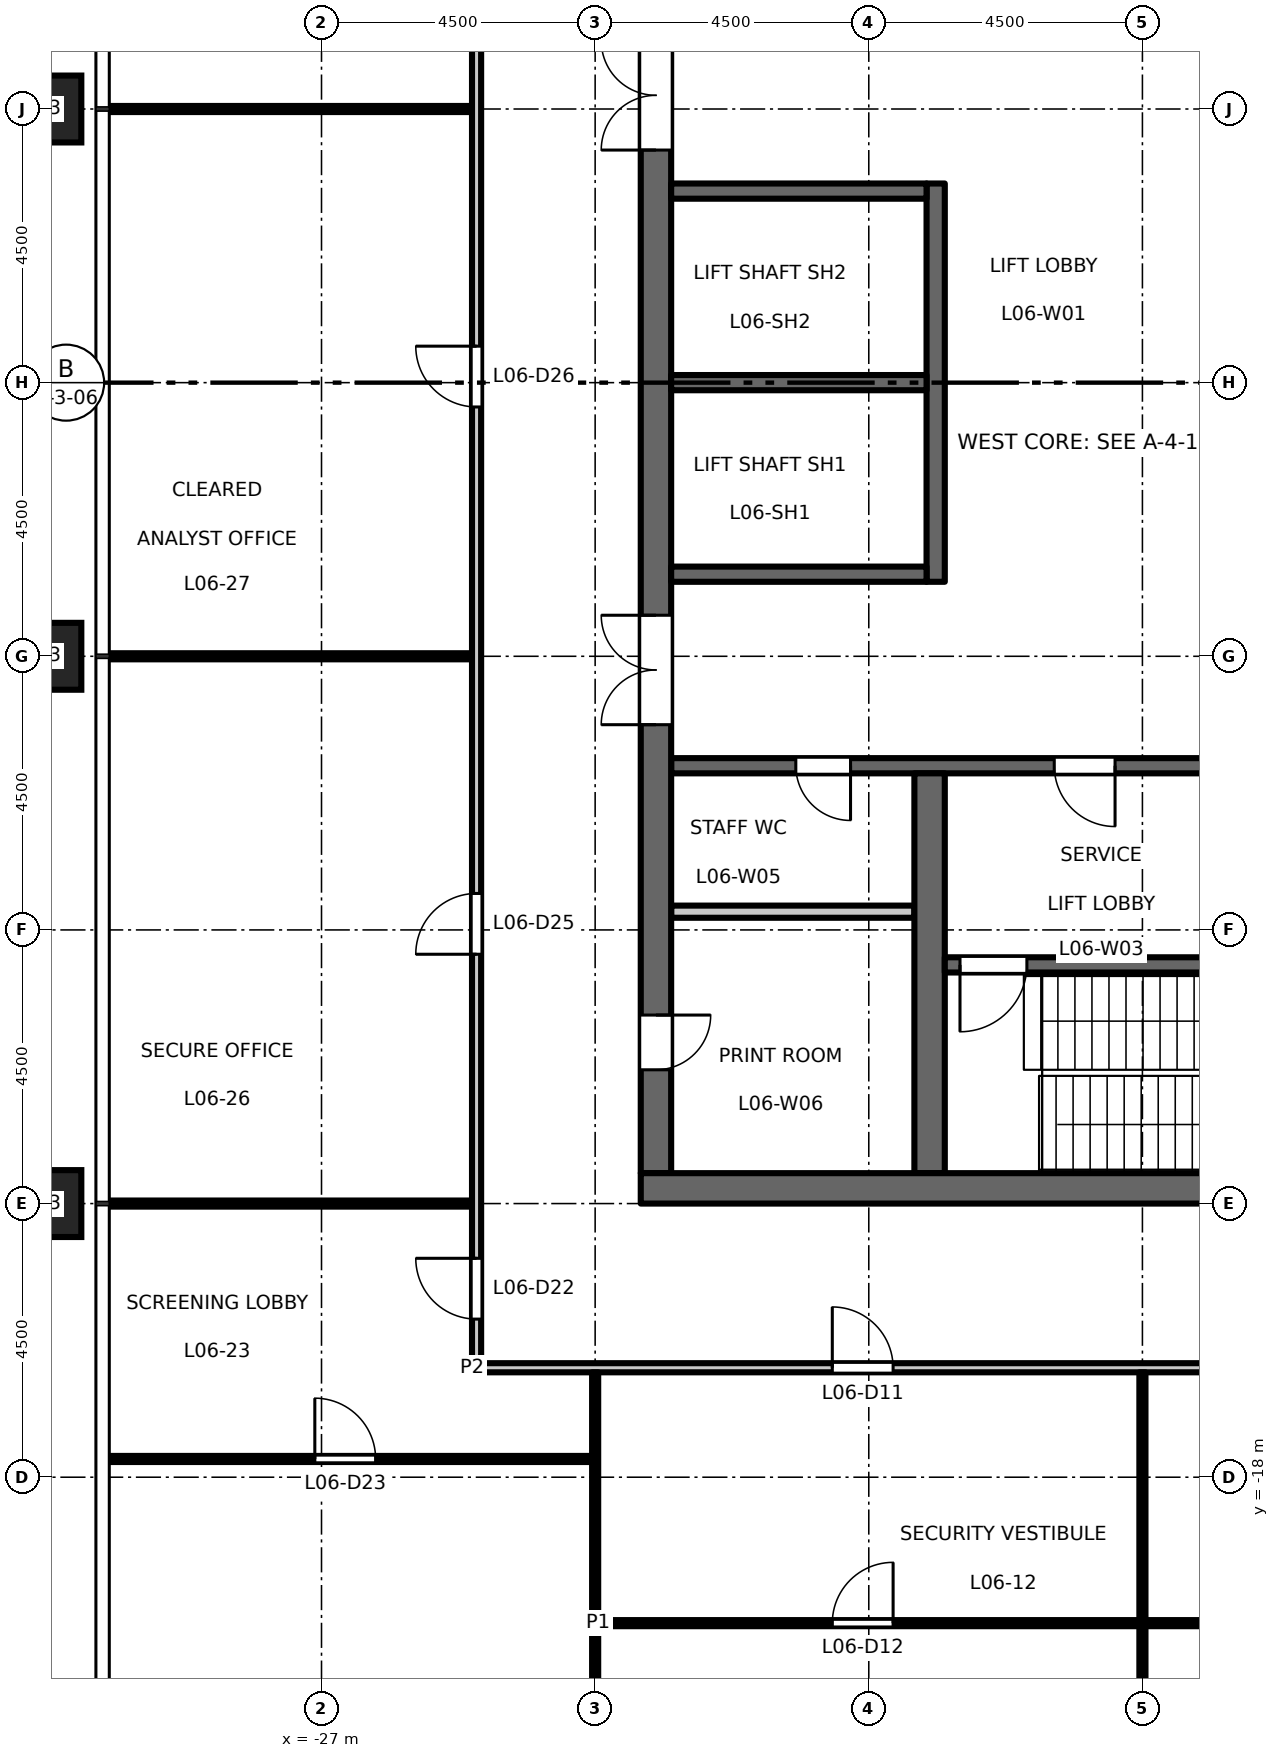
"""IFC4 building model, lengths in metres.
Left out: names, types, materials, properties, quantities, classifications, styles, units other than length and angle.
Written with IfcOpenShell. Run it as: python <this file> out.ifc"""

import sys

from ifc_helpers import new_model, si_unit, direction, frame, frame_2d, origin, origin_2d, place, context, subcontext, project, spatial, rectangle, hollow_rectangle, extrude, element, fill, save


model = new_model("IFC4")
c1 = context("Model", 3, precision=1e-05, world=origin(), true_north=direction((0.0, 1.0)))
c2 = subcontext(c1, "Body", "Model", "MODEL_VIEW")
j1 = project(units=[si_unit("LENGTHUNIT", "METRE"), si_unit("PLANEANGLEUNIT", "RADIAN")], contexts=[c1])
p1 = place(None, origin())
s1 = spatial("IfcSite", under=j1, at=p1, CompositionType="ELEMENT")
p2 = place(p1, origin())
s2 = spatial("IfcBuilding", under=s1, at=p2, CompositionType="ELEMENT")
p3 = place(p2, frame((0.0, 0.0, 31.2)))
s3 = spatial("IfcBuildingStorey", under=s2, at=p3, CompositionType="ELEMENT", Elevation=31.2)
for number, where, z_axis, x_axis in (
    (1, (-31.5, 4.5, 0.0), (0.0, 0.0, 1.0), (1.0, 0.0, 0.0)),
    (2, (-31.5, -4.5, 0.0), (0.0, 0.0, 1.0), (1.0, 0.0, 0.0)),
    (3, (-31.5, -13.5, 0.0), (0.0, 0.0, 1.0), (1.0, 0.0, 0.0)),
):
    element("IfcColumn", number, at=place(p3, frame(where, z_axis=z_axis, x_axis=x_axis)), inside=s3, PredefinedType="COLUMN", context=c2, shape_type="SweptSolid", body=[
        extrude(hollow_rectangle(XDim=1.1, YDim=1.1, WallThickness=0.07, at=origin_2d()), origin(), (0.0, 0.0, 1.0), 4.5),
    ])
p4 = place(p3, frame((-12.15, -6.3, 0.0), z_axis=(0.0, 0.0, 1.0), x_axis=(-1.0, 0.0, 0.0)))
e4 = element("IfcWall", 4, at=p4, inside=s3, PredefinedType="SHEAR", context=c2, shape_type="SweptSolid", body=[
    extrude(rectangle(XDim=9.1, YDim=0.25, at=frame_2d((4.55, 0.0))), origin(), (0.0, 0.0, 1.0), 4.35),
])
p5 = place(p4, frame((1.8, 0.0, 0.0)))
e5 = element("IfcOpeningElement", 5, at=p5, cuts=e4, PredefinedType="OPENING", context=c2, shape_type="SweptSolid", body=[
    extrude(rectangle(XDim=1.0, YDim=2.1, at=frame_2d((0.5, 1.05))), frame((0.0, 0.135, 0.0), z_axis=(0.0, -1.0, 0.0), x_axis=(1.0, 0.0, 0.0)), (0.0, 0.0, 1.0), 0.27),
])
p6 = place(p4, frame((6.15, 0.0, 0.0)))
e6 = element("IfcOpeningElement", 6, at=p6, cuts=e4, PredefinedType="OPENING", context=c2, shape_type="SweptSolid", body=[
    extrude(rectangle(XDim=0.9, YDim=2.1, at=frame_2d((0.45, 1.05))), frame((0.0, 0.135, 0.0), z_axis=(0.0, -1.0, 0.0), x_axis=(1.0, 0.0, 0.0)), (0.0, 0.0, 1.0), 0.27),
])
p7 = place(p3, frame((-21.5, -13.0, 0.0), z_axis=(0.0, 0.0, 1.0), x_axis=(0.0, 1.0, 0.0)))
e7 = element("IfcWall", 7, at=p7, inside=s3, PredefinedType="SHEAR", context=c2, shape_type="SweptSolid", body=[
    extrude(rectangle(XDim=26.0, YDim=0.5, at=frame_2d((13.0, 0.0))), origin(), (0.0, 0.0, 1.0), 4.35),
])
p8 = place(p7, frame((16.825, 0.0, 0.0)))
e8 = element("IfcOpeningElement", 8, at=p8, cuts=e7, PredefinedType="OPENING", context=c2, shape_type="SweptSolid", body=[
    extrude(rectangle(XDim=1.8, YDim=2.1, at=frame_2d((0.9, 1.05))), frame((0.0, 0.26, 0.0), z_axis=(0.0, -1.0, 0.0), x_axis=(1.0, 0.0, 0.0)), (0.0, 0.0, 1.0), 0.52),
])
p9 = place(p7, frame((7.375, 0.0, 0.0)))
e9 = element("IfcOpeningElement", 9, at=p9, cuts=e7, PredefinedType="OPENING", context=c2, shape_type="SweptSolid", body=[
    extrude(rectangle(XDim=1.8, YDim=2.1, at=frame_2d((0.9, 1.05))), frame((0.0, 0.26, 0.0), z_axis=(0.0, -1.0, 0.0), x_axis=(1.0, 0.0, 0.0)), (0.0, 0.0, 1.0), 0.52),
])
p10 = place(p7, frame((22.45, 0.0, 0.0)))
e10 = element("IfcOpeningElement", 10, at=p10, cuts=e7, PredefinedType="OPENING", context=c2, shape_type="SweptSolid", body=[
    extrude(rectangle(XDim=0.9, YDim=2.1, at=frame_2d((0.45, 1.05))), frame((0.0, 0.26, 0.0), z_axis=(0.0, -1.0, 0.0), x_axis=(1.0, 0.0, 0.0)), (0.0, 0.0, 1.0), 0.52),
])
p11 = place(p7, frame((1.7, 0.0, 0.0)))
e11 = element("IfcOpeningElement", 11, at=p11, cuts=e7, PredefinedType="OPENING", context=c2, shape_type="SweptSolid", body=[
    extrude(rectangle(XDim=0.9, YDim=2.1, at=frame_2d((0.45, 1.05))), frame((0.0, 0.26, 0.0), z_axis=(0.0, -1.0, 0.0), x_axis=(1.0, 0.0, 0.0)), (0.0, 0.0, 1.0), 0.52),
])
p12 = place(p3, frame((-17.25, -8.7, 0.0), z_axis=(0.0, 0.0, 1.0), x_axis=(-1.0, 0.0, 0.0)))
e12 = element("IfcWall", 12, at=p12, inside=s3, PredefinedType="PARTITIONING", context=c2, shape_type="SweptSolid", body=[
    extrude(rectangle(XDim=4.0, YDim=0.2, at=frame_2d((2.0, 0.0))), origin(), (0.0, 0.0, 1.0), 4.35),
])
p13 = place(p3, frame((-16.9, -3.275, 0.0), z_axis=(0.0, 0.0, 1.0), x_axis=(0.0, 1.0, 0.0)))
e13 = element("IfcWall", 13, at=p13, inside=s3, PredefinedType="SHEAR", context=c2, shape_type="SweptSolid", body=[
    extrude(rectangle(XDim=6.55, YDim=0.3, at=frame_2d((3.275, 0.0))), origin(), (0.0, 0.0, 1.0), 4.35),
])
for number, where, z_axis, x_axis in (
    (14, (-17.05, 0.0, 0.0), (0.0, 0.0, 1.0), (-1.0, 0.0, 0.0)),
    (15, (-17.05, 3.15, 0.0), (0.0, 0.0, 1.0), (-1.0, 0.0, 0.0)),
    (16, (-17.05, -3.15, 0.0), (0.0, 0.0, 1.0), (-1.0, 0.0, 0.0)),
):
    element("IfcWall", number, at=place(p3, frame(where, z_axis=z_axis, x_axis=x_axis)), inside=s3, PredefinedType="SHEAR", context=c2, shape_type="SweptSolid", body=[
        extrude(rectangle(XDim=4.2, YDim=0.25, at=frame_2d((2.1, 0.0))), origin(), (0.0, 0.0, 1.0), 4.35),
    ])
p14 = place(p3, frame((-17.0, -13.0, 0.0), z_axis=(0.0, 0.0, 1.0), x_axis=(0.0, 1.0, 0.0)))
e17 = element("IfcWall", 17, at=p14, inside=s3, PredefinedType="SHEAR", context=c2, shape_type="SweptSolid", body=[
    extrude(rectangle(XDim=6.575, YDim=0.5, at=frame_2d((3.288, 0.0))), origin(), (0.0, 0.0, 1.0), 4.35),
])
p15 = place(p3, frame((-8.75, -9.575, 0.0), z_axis=(0.0, 0.0, 1.0), x_axis=(-1.0, 0.0, 0.0)))
e18 = element("IfcWall", 18, at=p15, inside=s3, PredefinedType="SHEAR", context=c2, shape_type="SweptSolid", body=[
    extrude(rectangle(XDim=8.0, YDim=0.25, at=frame_2d((4.0, 0.0))), origin(), (0.0, 0.0, 1.0), 4.35),
])
p16 = place(p15, frame((6.65, 0.0, 0.0)))
e19 = element("IfcOpeningElement", 19, at=p16, cuts=e18, PredefinedType="OPENING", context=c2, shape_type="SweptSolid", body=[
    extrude(rectangle(XDim=1.1, YDim=2.1, at=frame_2d((0.55, 1.05))), frame((0.0, 0.135, 0.0), z_axis=(0.0, -1.0, 0.0), x_axis=(1.0, 0.0, 0.0)), (0.0, 0.0, 1.0), 0.27),
])
p17 = place(p3, frame((-8.25, -13.25, 0.0), z_axis=(0.0, 0.0, 1.0), x_axis=(-1.0, 0.0, 0.0)))
e20 = element("IfcWall", 20, at=p17, inside=s3, PredefinedType="SHEAR", context=c2, shape_type="SweptSolid", body=[
    extrude(rectangle(XDim=13.5, YDim=0.5, at=frame_2d((6.75, 0.0))), origin(), (0.0, 0.0, 1.0), 4.35),
])
p18 = place(p3, frame((-22.45, -20.4, 0.0), z_axis=(0.0, 0.0, 1.0), x_axis=(1.0, 0.0, 0.0)))
e21 = element("IfcWall", 21, at=p18, inside=s3, PredefinedType="PARTITIONING", context=c2, shape_type="SweptSolid", body=[
    extrude(rectangle(XDim=17.9, YDim=0.1, at=frame_2d((8.95, 0.0))), origin(), (0.0, 0.0, 1.0), 4.35),
])
p19 = place(p18, frame((3.85, 0.0, 0.0)))
e22 = element("IfcOpeningElement", 22, at=p19, cuts=e21, PredefinedType="OPENING", context=c2, shape_type="SweptSolid", body=[
    extrude(rectangle(XDim=1.0, YDim=2.1, at=frame_2d((0.5, 1.05))), frame((0.0, 0.06, 0.0), z_axis=(0.0, -1.0, 0.0), x_axis=(1.0, 0.0, 0.0)), (0.0, 0.0, 1.0), 0.12),
])
p20 = place(p18, frame((12.85, 0.0, 0.0)))
e23 = element("IfcOpeningElement", 23, at=p20, cuts=e21, PredefinedType="OPENING", context=c2, shape_type="SweptSolid", body=[
    extrude(rectangle(XDim=1.0, YDim=2.1, at=frame_2d((0.5, 1.05))), frame((0.0, 0.06, 0.0), z_axis=(0.0, -1.0, 0.0), x_axis=(1.0, 0.0, 0.0)), (0.0, 0.0, 1.0), 0.12),
])
p21 = place(p3, frame((-30.51, -17.7, 0.0), z_axis=(0.0, 0.0, 1.0), x_axis=(1.0, 0.0, 0.0)))
e24 = element("IfcWall", 24, at=p21, inside=s3, PredefinedType="PARTITIONING", context=c2, shape_type="SweptSolid", body=[
    extrude(rectangle(XDim=7.96, YDim=0.1, at=frame_2d((3.98, 0.0))), origin(), (0.0, 0.0, 1.0), 4.35),
])
p22 = place(p21, frame((3.4, 0.0, 0.0)))
e25 = element("IfcOpeningElement", 25, at=p22, cuts=e24, PredefinedType="OPENING", context=c2, shape_type="SweptSolid", body=[
    extrude(rectangle(XDim=1.0, YDim=2.1, at=frame_2d((0.5, 1.05))), frame((0.0, 0.06, 0.0), z_axis=(0.0, -1.0, 0.0), x_axis=(1.0, 0.0, 0.0)), (0.0, 0.0, 1.0), 0.12),
])
p23 = place(p3, frame((-24.525, -16.2, 0.0), z_axis=(0.0, 0.0, 1.0), x_axis=(1.0, 0.0, 0.0)))
e26 = element("IfcWall", 26, at=p23, inside=s3, PredefinedType="PARTITIONING", context=c2, shape_type="SweptSolid", body=[
    extrude(rectangle(XDim=49.05, YDim=0.15, at=frame_2d((24.525, 0.0))), origin(), (0.0, 0.0, 1.0), 4.35),
])
p24 = place(p23, frame((5.925, 0.0, 0.0)))
e27 = element("IfcOpeningElement", 27, at=p24, cuts=e26, PredefinedType="OPENING", context=c2, shape_type="SweptSolid", body=[
    extrude(rectangle(XDim=1.0, YDim=2.1, at=frame_2d((0.5, 1.05))), frame((0.0, 0.085, 0.0), z_axis=(0.0, -1.0, 0.0), x_axis=(1.0, 0.0, 0.0)), (0.0, 0.0, 1.0), 0.17),
])
p25 = place(p23, frame((14.925, 0.0, 0.0)))
e28 = element("IfcOpeningElement", 28, at=p25, cuts=e26, PredefinedType="OPENING", context=c2, shape_type="SweptSolid", body=[
    extrude(rectangle(XDim=1.0, YDim=2.1, at=frame_2d((0.5, 1.05))), frame((0.0, 0.085, 0.0), z_axis=(0.0, -1.0, 0.0), x_axis=(1.0, 0.0, 0.0)), (0.0, 0.0, 1.0), 0.17),
])
p26 = place(p23, frame((23.925, 0.0, 0.0)))
e29 = element("IfcOpeningElement", 29, at=p26, cuts=e26, PredefinedType="OPENING", context=c2, shape_type="SweptSolid", body=[
    extrude(rectangle(XDim=1.0, YDim=2.1, at=frame_2d((0.5, 1.05))), frame((0.0, 0.085, 0.0), z_axis=(0.0, -1.0, 0.0), x_axis=(1.0, 0.0, 0.0)), (0.0, 0.0, 1.0), 0.17),
])
p27 = place(p23, frame((32.925, 0.0, 0.0)))
e30 = element("IfcOpeningElement", 30, at=p27, cuts=e26, PredefinedType="OPENING", context=c2, shape_type="SweptSolid", body=[
    extrude(rectangle(XDim=1.0, YDim=2.1, at=frame_2d((0.5, 1.05))), frame((0.0, 0.085, 0.0), z_axis=(0.0, -1.0, 0.0), x_axis=(1.0, 0.0, 0.0)), (0.0, 0.0, 1.0), 0.17),
])
p28 = place(p23, frame((41.925, 0.0, 0.0)))
e31 = element("IfcOpeningElement", 31, at=p28, cuts=e26, PredefinedType="OPENING", context=c2, shape_type="SweptSolid", body=[
    extrude(rectangle(XDim=1.0, YDim=2.1, at=frame_2d((0.5, 1.05))), frame((0.0, 0.085, 0.0), z_axis=(0.0, -1.0, 0.0), x_axis=(1.0, 0.0, 0.0)), (0.0, 0.0, 1.0), 0.17),
])
p29 = place(p3, frame((-30.51, -13.5, 0.0), z_axis=(0.0, 0.0, 1.0), x_axis=(1.0, 0.0, 0.0)))
e32 = element("IfcWall", 32, at=p29, inside=s3, PredefinedType="PARTITIONING", context=c2, shape_type="SweptSolid", body=[
    extrude(rectangle(XDim=5.985, YDim=0.1, at=frame_2d((2.993, 0.0))), origin(), (0.0, 0.0, 1.0), 3.35),
])
for number, where, z_axis, x_axis in (
    (33, (-30.51, -4.5, 0.0), (0.0, 0.0, 1.0), (1.0, 0.0, 0.0)),
    (34, (-30.51, 4.5, 0.0), (0.0, 0.0, 1.0), (1.0, 0.0, 0.0)),
):
    element("IfcWall", number, at=place(p3, frame(where, z_axis=z_axis, x_axis=x_axis)), inside=s3, PredefinedType="PARTITIONING", context=c2, shape_type="SweptSolid", body=[
        extrude(rectangle(XDim=5.985, YDim=0.1, at=frame_2d((2.993, 0.0))), origin(), (0.0, 0.0, 1.0), 4.35),
    ])
p30 = place(p3, frame((-24.45, -16.125, 0.0), z_axis=(0.0, 0.0, 1.0), x_axis=(0.0, 1.0, 0.0)))
e35 = element("IfcWall", 35, at=p30, inside=s3, PredefinedType="PARTITIONING", context=c2, shape_type="SweptSolid", body=[
    extrude(rectangle(XDim=32.25, YDim=0.15, at=frame_2d((16.125, 0.0))), origin(), (0.0, 0.0, 1.0), 4.35),
])
p31 = place(p30, frame((30.425, 0.0, 0.0)))
e36 = element("IfcOpeningElement", 36, at=p31, cuts=e35, PredefinedType="OPENING", context=c2, shape_type="SweptSolid", body=[
    extrude(rectangle(XDim=1.0, YDim=2.1, at=frame_2d((0.5, 1.05))), frame((0.0, 0.085, 0.0), z_axis=(0.0, -1.0, 0.0), x_axis=(1.0, 0.0, 0.0)), (0.0, 0.0, 1.0), 0.17),
])
p32 = place(p30, frame((0.725, 0.0, 0.0)))
e37 = element("IfcOpeningElement", 37, at=p32, cuts=e35, PredefinedType="OPENING", context=c2, shape_type="SweptSolid", body=[
    extrude(rectangle(XDim=1.0, YDim=2.1, at=frame_2d((0.5, 1.05))), frame((0.0, 0.085, 0.0), z_axis=(0.0, -1.0, 0.0), x_axis=(1.0, 0.0, 0.0)), (0.0, 0.0, 1.0), 0.17),
])
p33 = place(p30, frame((6.725, 0.0, 0.0)))
e38 = element("IfcOpeningElement", 38, at=p33, cuts=e35, PredefinedType="OPENING", context=c2, shape_type="SweptSolid", body=[
    extrude(rectangle(XDim=1.0, YDim=2.1, at=frame_2d((0.5, 1.05))), frame((0.0, 0.085, 0.0), z_axis=(0.0, -1.0, 0.0), x_axis=(1.0, 0.0, 0.0)), (0.0, 0.0, 1.0), 0.17),
])
p34 = place(p30, frame((15.725, 0.0, 0.0)))
e39 = element("IfcOpeningElement", 39, at=p34, cuts=e35, PredefinedType="OPENING", context=c2, shape_type="SweptSolid", body=[
    extrude(rectangle(XDim=1.0, YDim=2.1, at=frame_2d((0.5, 1.05))), frame((0.0, 0.085, 0.0), z_axis=(0.0, -1.0, 0.0), x_axis=(1.0, 0.0, 0.0)), (0.0, 0.0, 1.0), 0.17),
])
p35 = place(p30, frame((24.725, 0.0, 0.0)))
e40 = element("IfcOpeningElement", 40, at=p35, cuts=e35, PredefinedType="OPENING", context=c2, shape_type="SweptSolid", body=[
    extrude(rectangle(XDim=1.0, YDim=2.1, at=frame_2d((0.5, 1.05))), frame((0.0, 0.085, 0.0), z_axis=(0.0, -1.0, 0.0), x_axis=(1.0, 0.0, 0.0)), (0.0, 0.0, 1.0), 0.17),
])
p36 = place(p3, frame((-22.5, -30.428, 0.0), z_axis=(0.0, 0.0, 1.0), x_axis=(0.0, 1.0, 0.0)))
e41 = element("IfcWall", 41, at=p36, inside=s3, PredefinedType="PARTITIONING", context=c2, shape_type="SweptSolid", body=[
    extrude(rectangle(XDim=14.153, YDim=0.1, at=frame_2d((7.077, 0.0))), origin(), (0.0, 0.0, 1.0), 3.35),
])
p37 = place(p3, frame((-13.5, -30.51, 0.0), z_axis=(0.0, 0.0, 1.0), x_axis=(0.0, 1.0, 0.0)))
e42 = element("IfcWall", 42, at=p37, inside=s3, PredefinedType="PARTITIONING", context=c2, shape_type="SweptSolid", body=[
    extrude(rectangle(XDim=10.06, YDim=0.1, at=frame_2d((5.03, 0.0))), origin(), (0.0, 0.0, 1.0), 3.35),
])
p38 = place(p3, frame((-13.5, -20.35, 0.0), z_axis=(0.0, 0.0, 1.0), x_axis=(0.0, 1.0, 0.0)))
e43 = element("IfcWall", 43, at=p38, inside=s3, PredefinedType="PARTITIONING", context=c2, shape_type="SweptSolid", body=[
    extrude(rectangle(XDim=4.075, YDim=0.1, at=frame_2d((2.038, 0.0))), origin(), (0.0, 0.0, 1.0), 3.35),
])
p39 = place(p5, origin())
e44 = element("IfcDoor", 44, at=p39, inside=s3, OperationType="SINGLE_SWING_RIGHT", PredefinedType="DOOR", context=c2, shape_type="SweptSolid", body=[
    extrude(rectangle(XDim=1.0, YDim=2.1, at=frame_2d((0.5, 1.05))), frame((0.0, 0.025, 0.0), z_axis=(0.0, -1.0, 0.0), x_axis=(1.0, 0.0, 0.0)), (0.0, 0.0, 1.0), 0.05),
])
fill(e5, e44)
p40 = place(p16, origin())
e45 = element("IfcDoor", 45, at=p40, inside=s3, OperationType="SINGLE_SWING_LEFT", PredefinedType="DOOR", context=c2, shape_type="SweptSolid", body=[
    extrude(rectangle(XDim=1.1, YDim=2.1, at=frame_2d((0.55, 1.05))), frame((0.0, 0.025, 0.0), z_axis=(0.0, -1.0, 0.0), x_axis=(1.0, 0.0, 0.0)), (0.0, 0.0, 1.0), 0.05),
])
fill(e19, e45)
p41 = place(p8, origin())
e46 = element("IfcDoor", 46, at=p41, inside=s3, OperationType="DOUBLE_DOOR_DOUBLE_SWING", PredefinedType="DOOR", context=c2, shape_type="SweptSolid", body=[
    extrude(rectangle(XDim=1.8, YDim=2.1, at=frame_2d((0.9, 1.05))), frame((0.0, 0.025, 0.0), z_axis=(0.0, -1.0, 0.0), x_axis=(1.0, 0.0, 0.0)), (0.0, 0.0, 1.0), 0.05),
])
fill(e8, e46)
p42 = place(p9, origin())
e47 = element("IfcDoor", 47, at=p42, inside=s3, OperationType="DOUBLE_DOOR_DOUBLE_SWING", PredefinedType="DOOR", context=c2, shape_type="SweptSolid", body=[
    extrude(rectangle(XDim=1.8, YDim=2.1, at=frame_2d((0.9, 1.05))), frame((0.0, 0.025, 0.0), z_axis=(0.0, -1.0, 0.0), x_axis=(1.0, 0.0, 0.0)), (0.0, 0.0, 1.0), 0.05),
])
fill(e9, e47)
p43 = place(p6, origin())
e48 = element("IfcDoor", 48, at=p43, inside=s3, OperationType="SINGLE_SWING_RIGHT", PredefinedType="DOOR", context=c2, shape_type="SweptSolid", body=[
    extrude(rectangle(XDim=0.9, YDim=2.1, at=frame_2d((0.45, 1.05))), frame((0.0, 0.025, 0.0), z_axis=(0.0, -1.0, 0.0), x_axis=(1.0, 0.0, 0.0)), (0.0, 0.0, 1.0), 0.05),
])
fill(e6, e48)
p44 = place(p11, origin())
e49 = element("IfcDoor", 49, at=p44, inside=s3, OperationType="SINGLE_SWING_RIGHT", PredefinedType="DOOR", context=c2, shape_type="SweptSolid", body=[
    extrude(rectangle(XDim=0.9, YDim=2.1, at=frame_2d((0.45, 1.05))), frame((0.0, 0.025, 0.0), z_axis=(0.0, -1.0, 0.0), x_axis=(1.0, 0.0, 0.0)), (0.0, 0.0, 1.0), 0.05),
])
fill(e11, e49)
p45 = place(p24, origin())
e50 = element("IfcDoor", 50, at=p45, inside=s3, OperationType="SINGLE_SWING_LEFT", PredefinedType="DOOR", context=c2, shape_type="SweptSolid", body=[
    extrude(rectangle(XDim=1.0, YDim=2.1, at=frame_2d((0.5, 1.05))), frame((0.0, 0.025, 0.0), z_axis=(0.0, -1.0, 0.0), x_axis=(1.0, 0.0, 0.0)), (0.0, 0.0, 1.0), 0.05),
])
fill(e27, e50)
p46 = place(p19, origin())
e51 = element("IfcDoor", 51, at=p46, inside=s3, OperationType="SINGLE_SWING_RIGHT", PredefinedType="DOOR", context=c2, shape_type="SweptSolid", body=[
    extrude(rectangle(XDim=1.0, YDim=2.1, at=frame_2d((0.5, 1.05))), frame((0.0, 0.025, 0.0), z_axis=(0.0, -1.0, 0.0), x_axis=(1.0, 0.0, 0.0)), (0.0, 0.0, 1.0), 0.05),
])
fill(e22, e51)
p47 = place(p32, origin())
e52 = element("IfcDoor", 52, at=p47, inside=s3, OperationType="SINGLE_SWING_RIGHT", PredefinedType="DOOR", context=c2, shape_type="SweptSolid", body=[
    extrude(rectangle(XDim=1.0, YDim=2.1, at=frame_2d((0.5, 1.05))), frame((0.0, 0.025, 0.0), z_axis=(0.0, -1.0, 0.0), x_axis=(1.0, 0.0, 0.0)), (0.0, 0.0, 1.0), 0.05),
])
fill(e37, e52)
p48 = place(p22, origin())
e53 = element("IfcDoor", 53, at=p48, inside=s3, OperationType="SINGLE_SWING_LEFT", PredefinedType="DOOR", context=c2, shape_type="SweptSolid", body=[
    extrude(rectangle(XDim=1.0, YDim=2.1, at=frame_2d((0.5, 1.05))), frame((0.0, 0.025, 0.0), z_axis=(0.0, -1.0, 0.0), x_axis=(1.0, 0.0, 0.0)), (0.0, 0.0, 1.0), 0.05),
])
fill(e25, e53)
p49 = place(p33, origin())
e54 = element("IfcDoor", 54, at=p49, inside=s3, OperationType="SINGLE_SWING_LEFT", PredefinedType="DOOR", context=c2, shape_type="SweptSolid", body=[
    extrude(rectangle(XDim=1.0, YDim=2.1, at=frame_2d((0.5, 1.05))), frame((0.0, 0.025, 0.0), z_axis=(0.0, -1.0, 0.0), x_axis=(1.0, 0.0, 0.0)), (0.0, 0.0, 1.0), 0.05),
])
fill(e38, e54)
p50 = place(p34, origin())
e55 = element("IfcDoor", 55, at=p50, inside=s3, OperationType="SINGLE_SWING_RIGHT", PredefinedType="DOOR", context=c2, shape_type="SweptSolid", body=[
    extrude(rectangle(XDim=1.0, YDim=2.1, at=frame_2d((0.5, 1.05))), frame((0.0, 0.025, 0.0), z_axis=(0.0, -1.0, 0.0), x_axis=(1.0, 0.0, 0.0)), (0.0, 0.0, 1.0), 0.05),
])
fill(e39, e55)
save(model, sys.argv[1])
